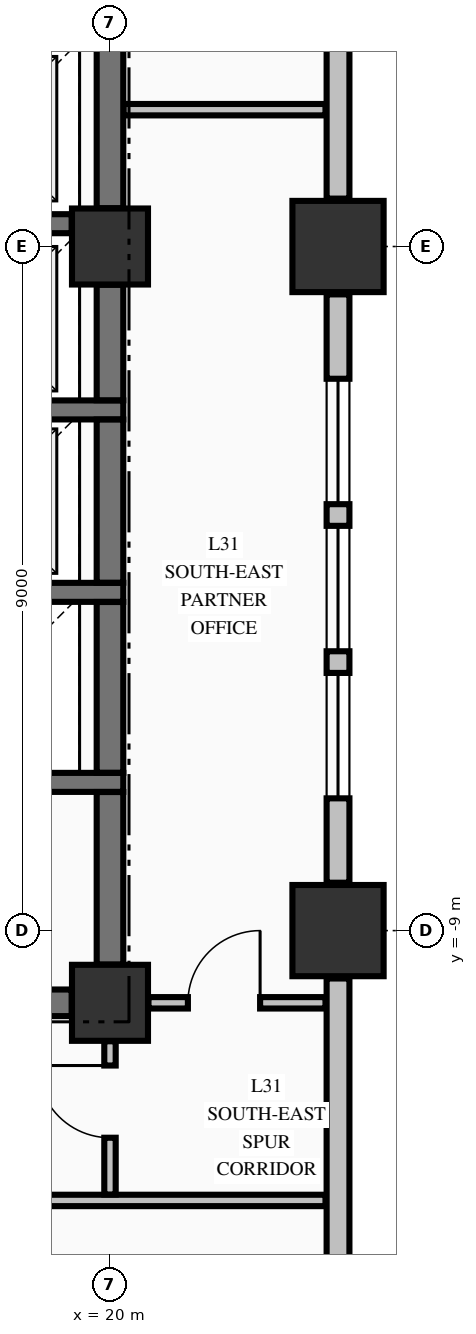
"""IFC4 building model, lengths in metres.
Left out: names, types, materials, properties, quantities, classifications, styles, units other than length and angle.
Written with IfcOpenShell. Run it as: python <this file> out.ifc"""

import sys

from ifc_helpers import new_model, si_unit, direction, frame, frame_2d, origin, origin_2d, place, context, subcontext, project, spatial, rectangle, extrude, element, fill, save


model = new_model("IFC4")
c1 = context("Model", 3, precision=1e-05, world=origin(), true_north=direction((0.0, 1.0)))
c2 = subcontext(c1, "Body", "Model", "MODEL_VIEW")
j1 = project(units=[si_unit("LENGTHUNIT", "METRE"), si_unit("PLANEANGLEUNIT", "RADIAN")], contexts=[c1])
p1 = place(None, origin())
s1 = spatial("IfcSite", under=j1, at=p1, CompositionType="ELEMENT")
p2 = place(p1, origin())
s2 = spatial("IfcBuilding", under=s1, at=p2, CompositionType="ELEMENT")
p3 = place(p2, frame((0.0, 0.0, 124.92)))
s3 = spatial("IfcBuildingStorey", under=s2, at=p3, CompositionType="ELEMENT", Elevation=124.92)
for number, where, z_axis, x_axis in (
    (1, (23.0, -9.0, -0.25), (0.0, 0.0, 1.0), (1.0, 0.0, 0.0)),
    (2, (23.0, 0.0, -0.25), (0.0, 0.0, 1.0), (1.0, 0.0, 0.0)),
):
    element("IfcColumn", number, at=place(p3, frame(where, z_axis=z_axis, x_axis=x_axis)), inside=s3, PredefinedType="COLUMN", context=c2, shape_type="SweptSolid", body=[
        extrude(rectangle(XDim=1.2, YDim=1.2, at=origin_2d()), origin(), (0.0, 0.0, 1.0), 3.57),
    ])
for number, where, z_axis, x_axis in (
    (3, (20.0, -9.95, -0.25), (0.0, 0.0, 1.0), (1.0, 0.0, 0.0)),
    (4, (20.0, 0.0, -0.25), (0.0, 0.0, 1.0), (1.0, 0.0, 0.0)),
):
    element("IfcColumn", number, at=place(p3, frame(where, z_axis=z_axis, x_axis=x_axis)), inside=s3, PredefinedType="COLUMN", context=c2, shape_type="SweptSolid", body=[
        extrude(rectangle(XDim=1.0, YDim=1.0, at=origin_2d()), origin(), (0.0, 0.0, 1.0), 3.57),
    ])
p4 = place(p3, frame((23.0, -20.37, 0.0), z_axis=(0.0, 0.0, 1.0), x_axis=(0.0, 1.0, 0.0)))
e5 = element("IfcWall", 5, at=p4, inside=s3, PredefinedType="STANDARD", context=c2, shape_type="SweptSolid", body=[
    extrude(rectangle(XDim=10.74, YDim=0.3, at=frame_2d((5.37, 0.0))), origin(), (0.0, 0.0, 1.0), 2.712),
])
p5 = place(p3, frame((23.0, -8.37, 0.0), z_axis=(0.0, 0.0, 1.0), x_axis=(0.0, 1.0, 0.0)))
e6 = element("IfcWall", 6, at=p5, inside=s3, PredefinedType="STANDARD", context=c2, shape_type="SweptSolid", body=[
    extrude(rectangle(XDim=7.74, YDim=0.3, at=frame_2d((3.87, 0.0))), origin(), (0.0, 0.0, 1.0), 2.712),
])
p6 = place(p5, frame((1.11, 0.0, 0.8)))
e7 = element("IfcOpeningElement", 7, at=p6, cuts=e6, PredefinedType="OPENING", context=c2, shape_type="SweptSolid", body=[
    extrude(rectangle(XDim=1.65, YDim=1.7, at=frame_2d((0.825, 0.85))), frame((0.0, 0.16, 0.0), z_axis=(0.0, -1.0, 0.0), x_axis=(1.0, 0.0, 0.0)), (0.0, 0.0, 1.0), 0.32),
])
p7 = place(p5, frame((3.045, 0.0, 0.8)))
e8 = element("IfcOpeningElement", 8, at=p7, cuts=e6, PredefinedType="OPENING", context=c2, shape_type="SweptSolid", body=[
    extrude(rectangle(XDim=1.65, YDim=1.7, at=frame_2d((0.825, 0.85))), frame((0.0, 0.16, 0.0), z_axis=(0.0, -1.0, 0.0), x_axis=(1.0, 0.0, 0.0)), (0.0, 0.0, 1.0), 0.32),
])
p8 = place(p5, frame((4.98, 0.0, 0.8)))
e9 = element("IfcOpeningElement", 9, at=p8, cuts=e6, PredefinedType="OPENING", context=c2, shape_type="SweptSolid", body=[
    extrude(rectangle(XDim=1.65, YDim=1.7, at=frame_2d((0.825, 0.85))), frame((0.0, 0.16, 0.0), z_axis=(0.0, -1.0, 0.0), x_axis=(1.0, 0.0, 0.0)), (0.0, 0.0, 1.0), 0.32),
])
p9 = place(p3, frame((23.0, 0.63, 0.0), z_axis=(0.0, 0.0, 1.0), x_axis=(0.0, 1.0, 0.0)))
e10 = element("IfcWall", 10, at=p9, inside=s3, PredefinedType="STANDARD", context=c2, shape_type="SweptSolid", body=[
    extrude(rectangle(XDim=7.74, YDim=0.3, at=frame_2d((3.87, 0.0))), origin(), (0.0, 0.0, 1.0), 2.712),
])
p10 = place(p9, frame((3.045, 0.0, 0.8)))
e11 = element("IfcOpeningElement", 11, at=p10, cuts=e10, PredefinedType="OPENING", context=c2, shape_type="SweptSolid", body=[
    extrude(rectangle(XDim=1.65, YDim=1.7, at=frame_2d((0.825, 0.85))), frame((0.0, 0.16, 0.0), z_axis=(0.0, -1.0, 0.0), x_axis=(1.0, 0.0, 0.0)), (0.0, 0.0, 1.0), 0.32),
])
p11 = place(p9, frame((4.98, 0.0, 0.8)))
e12 = element("IfcOpeningElement", 12, at=p11, cuts=e10, PredefinedType="OPENING", context=c2, shape_type="SweptSolid", body=[
    extrude(rectangle(XDim=1.65, YDim=1.7, at=frame_2d((0.825, 0.85))), frame((0.0, 0.16, 0.0), z_axis=(0.0, -1.0, 0.0), x_axis=(1.0, 0.0, 0.0)), (0.0, 0.0, 1.0), 0.32),
])
p12 = place(p3, frame((14.7, -9.95, 0.0), z_axis=(0.0, 0.0, 1.0), x_axis=(1.0, 0.0, 0.0)))
e13 = element("IfcWall", 13, at=p12, inside=s3, PredefinedType="SHEAR", context=c2, shape_type="SweptSolid", body=[
    extrude(rectangle(XDim=4.796, YDim=0.35, at=frame_2d((2.398, 0.0))), origin(), (0.0, 0.0, 1.0), 3.32),
])
p13 = place(p12, frame((0.65, 0.0, 0.0)))
e14 = element("IfcOpeningElement", 14, at=p13, cuts=e13, PredefinedType="OPENING", context=c2, shape_type="SweptSolid", body=[
    extrude(rectangle(XDim=1.2, YDim=2.15, at=frame_2d((0.6, 1.075))), frame((0.0, 0.185, 0.0), z_axis=(0.0, -1.0, 0.0), x_axis=(1.0, 0.0, 0.0)), (0.0, 0.0, 1.0), 0.37),
])
for number, where, z_axis, x_axis in (
    (15, (17.025, -7.05, 0.0), (0.0, 0.0, 1.0), (1.0, 0.0, 0.0)),
    (16, (17.025, -4.55, 0.0), (0.0, 0.0, 1.0), (1.0, 0.0, 0.0)),
    (17, (17.025, -2.15, 0.0), (0.0, 0.0, 1.0), (1.0, 0.0, 0.0)),
):
    element("IfcWall", number, at=place(p3, frame(where, z_axis=z_axis, x_axis=x_axis)), inside=s3, PredefinedType="SOLIDWALL", context=c2, shape_type="SweptSolid", body=[
        extrude(rectangle(XDim=3.15, YDim=0.25, at=frame_2d((1.575, 0.0))), origin(), (0.0, 0.0, 1.0), 3.32),
    ])
p14 = place(p3, frame((17.025, 0.3, 0.0), z_axis=(0.0, 0.0, 1.0), x_axis=(1.0, 0.0, 0.0)))
e18 = element("IfcWall", 18, at=p14, inside=s3, PredefinedType="SOLIDWALL", context=c2, shape_type="SweptSolid", body=[
    extrude(rectangle(XDim=2.471, YDim=0.25, at=frame_2d((1.236, 0.0))), origin(), (0.0, 0.0, 1.0), 3.32),
])
p15 = place(p3, frame((-27.835, -12.55, 0.0), z_axis=(0.0, 0.0, 1.0), x_axis=(1.0, 0.0, 0.0)))
e19 = element("IfcWall", 19, at=p15, inside=s3, PredefinedType="PARTITIONING", context=c2, shape_type="SweptSolid", body=[
    extrude(rectangle(XDim=50.67, YDim=0.15, at=frame_2d((25.335, 0.0))), origin(), (0.0, 0.0, 1.0), 3.32),
])
p16 = place(p15, frame((10.43, 0.0, 0.0)))
e20 = element("IfcOpeningElement", 20, at=p16, cuts=e19, PredefinedType="OPENING", context=c2, shape_type="SweptSolid", body=[
    extrude(rectangle(XDim=1.05, YDim=2.15, at=frame_2d((0.525, 1.075))), frame((0.0, 0.085, 0.0), z_axis=(0.0, -1.0, 0.0), x_axis=(1.0, 0.0, 0.0)), (0.0, 0.0, 1.0), 0.17),
])
p17 = place(p15, frame((15.06, 0.0, 0.0)))
e21 = element("IfcOpeningElement", 21, at=p17, cuts=e19, PredefinedType="OPENING", context=c2, shape_type="SweptSolid", body=[
    extrude(rectangle(XDim=0.95, YDim=2.15, at=frame_2d((0.475, 1.075))), frame((0.0, 0.085, 0.0), z_axis=(0.0, -1.0, 0.0), x_axis=(1.0, 0.0, 0.0)), (0.0, 0.0, 1.0), 0.17),
])
p18 = place(p15, frame((24.96, 0.0, 0.0)))
e22 = element("IfcOpeningElement", 22, at=p18, cuts=e19, PredefinedType="OPENING", context=c2, shape_type="SweptSolid", body=[
    extrude(rectangle(XDim=1.05, YDim=2.15, at=frame_2d((0.525, 1.075))), frame((0.0, 0.085, 0.0), z_axis=(0.0, -1.0, 0.0), x_axis=(1.0, 0.0, 0.0)), (0.0, 0.0, 1.0), 0.17),
])
p19 = place(p15, frame((33.01, 0.0, 0.0)))
e23 = element("IfcOpeningElement", 23, at=p19, cuts=e19, PredefinedType="OPENING", context=c2, shape_type="SweptSolid", body=[
    extrude(rectangle(XDim=0.95, YDim=2.15, at=frame_2d((0.475, 1.075))), frame((0.0, 0.085, 0.0), z_axis=(0.0, -1.0, 0.0), x_axis=(1.0, 0.0, 0.0)), (0.0, 0.0, 1.0), 0.17),
])
p20 = place(p15, frame((41.09, 0.0, 0.0)))
e24 = element("IfcOpeningElement", 24, at=p20, cuts=e19, PredefinedType="OPENING", context=c2, shape_type="SweptSolid", body=[
    extrude(rectangle(XDim=1.05, YDim=2.15, at=frame_2d((0.525, 1.075))), frame((0.0, 0.085, 0.0), z_axis=(0.0, -1.0, 0.0), x_axis=(1.0, 0.0, 0.0)), (0.0, 0.0, 1.0), 0.17),
])
p21 = place(p3, frame((20.506, -9.95, 0.0), z_axis=(0.0, 0.0, 1.0), x_axis=(1.0, 0.0, 0.0)))
e25 = element("IfcWall", 25, at=p21, inside=s3, PredefinedType="PARTITIONING", context=c2, shape_type="SweptSolid", body=[
    extrude(rectangle(XDim=2.329, YDim=0.15, at=frame_2d((1.165, 0.0))), origin(), (0.0, 0.0, 1.0), 3.32),
])
p22 = place(p21, frame((0.519, 0.0, 0.0)))
e26 = element("IfcOpeningElement", 26, at=p22, cuts=e25, PredefinedType="OPENING", context=c2, shape_type="SweptSolid", body=[
    extrude(rectangle(XDim=0.95, YDim=2.15, at=frame_2d((0.475, 1.075))), frame((0.0, 0.085, 0.0), z_axis=(0.0, -1.0, 0.0), x_axis=(1.0, 0.0, 0.0)), (0.0, 0.0, 1.0), 0.17),
])
p23 = place(p3, frame((20.178, 1.8, 0.0), z_axis=(0.0, 0.0, 1.0), x_axis=(1.0, 0.0, 0.0)))
e27 = element("IfcWall", 27, at=p23, inside=s3, PredefinedType="PARTITIONING", context=c2, shape_type="SweptSolid", body=[
    extrude(rectangle(XDim=2.657, YDim=0.15, at=frame_2d((1.329, 0.0))), origin(), (0.0, 0.0, 1.0), 3.32),
])
p24 = place(p3, frame((20.0, -9.446, 0.0), z_axis=(0.0, 0.0, 1.0), x_axis=(0.0, 1.0, 0.0)))
e28 = element("IfcWall", 28, at=p24, inside=s3, PredefinedType="SHEAR", context=c2, shape_type="SweptSolid", body=[
    extrude(rectangle(XDim=2.269, YDim=0.35, at=frame_2d((1.135, 0.0))), origin(), (0.0, 0.0, 1.0), 3.32),
])
p25 = place(p3, frame((20.0, -6.923, 0.0), z_axis=(0.0, 0.0, 1.0), x_axis=(0.0, 1.0, 0.0)))
e29 = element("IfcWall", 29, at=p25, inside=s3, PredefinedType="SHEAR", context=c2, shape_type="SweptSolid", body=[
    extrude(rectangle(XDim=2.246, YDim=0.35, at=frame_2d((1.123, 0.0))), origin(), (0.0, 0.0, 1.0), 3.32),
])
p26 = place(p3, frame((20.0, -4.423, 0.0), z_axis=(0.0, 0.0, 1.0), x_axis=(0.0, 1.0, 0.0)))
e30 = element("IfcWall", 30, at=p26, inside=s3, PredefinedType="SHEAR", context=c2, shape_type="SweptSolid", body=[
    extrude(rectangle(XDim=2.146, YDim=0.35, at=frame_2d((1.073, 0.0))), origin(), (0.0, 0.0, 1.0), 3.32),
])
p27 = place(p3, frame((20.0, -2.023, 0.0), z_axis=(0.0, 0.0, 1.0), x_axis=(0.0, 1.0, 0.0)))
e31 = element("IfcWall", 31, at=p27, inside=s3, PredefinedType="SHEAR", context=c2, shape_type="SweptSolid", body=[
    extrude(rectangle(XDim=1.519, YDim=0.35, at=frame_2d((0.76, 0.0))), origin(), (0.0, 0.0, 1.0), 3.32),
])
p28 = place(p3, frame((20.0, 0.504, 0.0), z_axis=(0.0, 0.0, 1.0), x_axis=(0.0, 1.0, 0.0)))
e32 = element("IfcWall", 32, at=p28, inside=s3, PredefinedType="SHEAR", context=c2, shape_type="SweptSolid", body=[
    extrude(rectangle(XDim=2.119, YDim=0.35, at=frame_2d((1.06, 0.0))), origin(), (0.0, 0.0, 1.0), 3.32),
])
p29 = place(p3, frame((20.0, -12.472, 0.0), z_axis=(0.0, 0.0, 1.0), x_axis=(0.0, 1.0, 0.0)))
e33 = element("IfcWall", 33, at=p29, inside=s3, PredefinedType="PARTITIONING", context=c2, shape_type="SweptSolid", body=[
    extrude(rectangle(XDim=2.016, YDim=0.15, at=frame_2d((1.008, 0.0))), origin(), (0.0, 0.0, 1.0), 2.81),
])
p30 = place(p29, frame((0.747, 0.0, 0.0)))
e34 = element("IfcOpeningElement", 34, at=p30, cuts=e33, PredefinedType="OPENING", context=c2, shape_type="SweptSolid", body=[
    extrude(rectangle(XDim=0.95, YDim=2.15, at=frame_2d((0.475, 1.075))), frame((0.0, 0.085, 0.0), z_axis=(0.0, -1.0, 0.0), x_axis=(1.0, 0.0, 0.0)), (0.0, 0.0, 1.0), 0.17),
])
p31 = place(p6, origin())
e35 = element("IfcWindow", 35, at=p31, inside=s3, PartitioningType="SINGLE_PANEL", PredefinedType="WINDOW", context=c2, shape_type="SweptSolid", body=[
    extrude(rectangle(XDim=1.65, YDim=1.7, at=frame_2d((0.825, 0.85))), frame((0.0, 0.03, 0.0), z_axis=(0.0, -1.0, 0.0), x_axis=(1.0, 0.0, 0.0)), (0.0, 0.0, 1.0), 0.06),
])
fill(e7, e35)
p32 = place(p7, origin())
e36 = element("IfcWindow", 36, at=p32, inside=s3, PartitioningType="SINGLE_PANEL", PredefinedType="WINDOW", context=c2, shape_type="SweptSolid", body=[
    extrude(rectangle(XDim=1.65, YDim=1.7, at=frame_2d((0.825, 0.85))), frame((0.0, 0.03, 0.0), z_axis=(0.0, -1.0, 0.0), x_axis=(1.0, 0.0, 0.0)), (0.0, 0.0, 1.0), 0.06),
])
fill(e8, e36)
p33 = place(p8, origin())
e37 = element("IfcWindow", 37, at=p33, inside=s3, PartitioningType="SINGLE_PANEL", PredefinedType="WINDOW", context=c2, shape_type="SweptSolid", body=[
    extrude(rectangle(XDim=1.65, YDim=1.7, at=frame_2d((0.825, 0.85))), frame((0.0, 0.03, 0.0), z_axis=(0.0, -1.0, 0.0), x_axis=(1.0, 0.0, 0.0)), (0.0, 0.0, 1.0), 0.06),
])
fill(e9, e37)
p34 = place(p30, origin())
e38 = element("IfcDoor", 38, at=p34, inside=s3, OperationType="SINGLE_SWING_RIGHT", PredefinedType="DOOR", context=c2, shape_type="SweptSolid", body=[
    extrude(rectangle(XDim=0.95, YDim=2.15, at=frame_2d((0.475, 1.075))), frame((0.0, 0.025, 0.0), z_axis=(0.0, -1.0, 0.0), x_axis=(1.0, 0.0, 0.0)), (0.0, 0.0, 1.0), 0.05),
])
fill(e34, e38)
p35 = place(p22, origin())
e39 = element("IfcDoor", 39, at=p35, inside=s3, OperationType="SINGLE_SWING_RIGHT", PredefinedType="DOOR", context=c2, shape_type="SweptSolid", body=[
    extrude(rectangle(XDim=0.95, YDim=2.15, at=frame_2d((0.475, 1.075))), frame((0.0, 0.025, 0.0), z_axis=(0.0, -1.0, 0.0), x_axis=(1.0, 0.0, 0.0)), (0.0, 0.0, 1.0), 0.05),
])
fill(e26, e39)
save(model, sys.argv[1])
